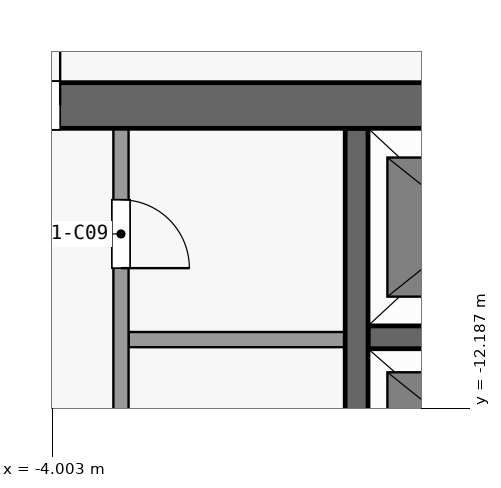
"""IFC4 building model, lengths in metres.
Left out: names, types, materials, properties, quantities, classifications, styles, units other than length and angle.
Written with IfcOpenShell. Run it as: python <this file> out.ifc"""

import sys

from ifc_helpers import new_model, si_unit, direction, frame, frame_2d, origin, place, context, subcontext, project, spatial, rectangle, extrude, element, fill, save


model = new_model("IFC4")
c1 = context("Model", 3, precision=1e-05, world=origin(), true_north=direction((0.0, 1.0)))
c2 = subcontext(c1, "Body", "Model", "MODEL_VIEW")
j1 = project(units=[si_unit("LENGTHUNIT", "METRE"), si_unit("PLANEANGLEUNIT", "RADIAN")], contexts=[c1])
p1 = place(None, origin())
s1 = spatial("IfcSite", under=j1, at=p1, CompositionType="ELEMENT")
p2 = place(p1, origin())
s2 = spatial("IfcBuilding", under=s1, at=p2, CompositionType="ELEMENT")
p3 = place(p2, frame((0.0, 0.0, 167.3)))
s3 = spatial("IfcBuildingStorey", under=s2, at=p3, CompositionType="ELEMENT", Elevation=167.3)
p4 = place(p3, frame((-13.3, -8.2, 0.0), z_axis=(0.0, 0.0, 1.0), x_axis=(1.0, 0.0, 0.0)))
e1 = element("IfcWall", 1, at=p4, inside=s3, PredefinedType="SHEAR", context=c2, shape_type="SweptSolid", body=[
    extrude(rectangle(XDim=26.6, YDim=0.6, at=frame_2d((13.3, 0.0))), origin(), (0.0, 0.0, 1.0), 3.3),
])
p5 = place(p4, frame((7.6, 0.0, 0.0)))
e2 = element("IfcOpeningElement", 2, at=p5, cuts=e1, PredefinedType="OPENING", context=c2, shape_type="SweptSolid", body=[
    extrude(rectangle(XDim=1.8, YDim=2.1, at=frame_2d((0.9, 1.05))), frame((0.0, 0.31, 0.0), z_axis=(0.0, -1.0, 0.0), x_axis=(1.0, 0.0, 0.0)), (0.0, 0.0, 1.0), 0.62),
])
p6 = place(p4, frame((17.2, 0.0, 0.0)))
e3 = element("IfcOpeningElement", 3, at=p6, cuts=e1, PredefinedType="OPENING", context=c2, shape_type="SweptSolid", body=[
    extrude(rectangle(XDim=1.8, YDim=2.1, at=frame_2d((0.9, 1.05))), frame((0.0, 0.31, 0.0), z_axis=(0.0, -1.0, 0.0), x_axis=(1.0, 0.0, 0.0)), (0.0, 0.0, 1.0), 0.62),
])
p7 = place(p4, frame((2.525, 0.0, 0.0)))
e4 = element("IfcOpeningElement", 4, at=p7, cuts=e1, PredefinedType="OPENING", context=c2, shape_type="SweptSolid", body=[
    extrude(rectangle(XDim=0.9, YDim=2.1, at=frame_2d((0.45, 1.05))), frame((0.0, 0.31, 0.0), z_axis=(0.0, -1.0, 0.0), x_axis=(1.0, 0.0, 0.0)), (0.0, 0.0, 1.0), 0.62),
])
p8 = place(p4, frame((23.875, 0.0, 0.0)))
e5 = element("IfcOpeningElement", 5, at=p8, cuts=e1, PredefinedType="OPENING", context=c2, shape_type="SweptSolid", body=[
    extrude(rectangle(XDim=1.2, YDim=2.1, at=frame_2d((0.6, 1.05))), frame((0.0, 0.31, 0.0), z_axis=(0.0, -1.0, 0.0), x_axis=(1.0, 0.0, 0.0)), (0.0, 0.0, 1.0), 0.62),
])
p9 = place(p3, frame((-3.0, -11.28, 0.0), z_axis=(0.0, 0.0, 1.0), x_axis=(1.0, 0.0, 0.0)))
e6 = element("IfcWall", 6, at=p9, inside=s3, PredefinedType="PARTITIONING", context=c2, shape_type="SweptSolid", body=[
    extrude(rectangle(XDim=2.85, YDim=0.2, at=frame_2d((1.425, 0.0))), origin(), (0.0, 0.0, 1.0), 3.3),
])
p10 = place(p3, frame((0.15, -11.25, 0.0), z_axis=(0.0, 0.0, 1.0), x_axis=(1.0, 0.0, 0.0)))
e7 = element("IfcWall", 7, at=p10, inside=s3, PredefinedType="SHEAR", context=c2, shape_type="SweptSolid", body=[
    extrude(rectangle(XDim=2.8, YDim=0.3, at=frame_2d((1.4, 0.0))), origin(), (0.0, 0.0, 1.0), 3.3),
])
p11 = place(p3, frame((-3.1, -8.5, 0.0), z_axis=(0.0, 0.0, 1.0), x_axis=(0.0, -1.0, 0.0)))
e8 = element("IfcWall", 8, at=p11, inside=s3, PredefinedType="PARTITIONING", context=c2, shape_type="SweptSolid", body=[
    extrude(rectangle(XDim=10.97, YDim=0.2, at=frame_2d((5.485, 0.0))), origin(), (0.0, 0.0, 1.0), 3.3),
])
p12 = place(p11, frame((6.35, 0.0, 0.0)))
e9 = element("IfcOpeningElement", 9, at=p12, cuts=e8, PredefinedType="OPENING", context=c2, shape_type="SweptSolid", body=[
    extrude(rectangle(XDim=1.2, YDim=2.1, at=frame_2d((0.6, 1.05))), frame((0.0, 0.11, 0.0), z_axis=(0.0, -1.0, 0.0), x_axis=(1.0, 0.0, 0.0)), (0.0, 0.0, 1.0), 0.22),
])
p13 = place(p11, frame((0.94, 0.0, 0.0)))
e10 = element("IfcOpeningElement", 10, at=p13, cuts=e8, PredefinedType="OPENING", context=c2, shape_type="SweptSolid", body=[
    extrude(rectangle(XDim=0.9, YDim=2.1, at=frame_2d((0.45, 1.05))), frame((0.0, 0.11, 0.0), z_axis=(0.0, -1.0, 0.0), x_axis=(1.0, 0.0, 0.0)), (0.0, 0.0, 1.0), 0.22),
])
p14 = place(p3, frame((0.0, -22.25, 0.0), z_axis=(0.0, 0.0, 1.0), x_axis=(0.0, 1.0, 0.0)))
e11 = element("IfcWall", 11, at=p14, inside=s3, PredefinedType="SHEAR", context=c2, shape_type="SweptSolid", body=[
    extrude(rectangle(XDim=13.75, YDim=0.3, at=frame_2d((6.875, 0.0))), origin(), (0.0, 0.0, 1.0), 3.3),
])
p15 = place(p5, origin())
e12 = element("IfcDoor", 12, at=p15, inside=s3, OperationType="DOUBLE_DOOR_SINGLE_SWING", PredefinedType="DOOR", context=c2, shape_type="SweptSolid", body=[
    extrude(rectangle(XDim=1.8, YDim=2.1, at=frame_2d((0.9, 1.05))), frame((0.0, 0.025, 0.0), z_axis=(0.0, -1.0, 0.0), x_axis=(1.0, 0.0, 0.0)), (0.0, 0.0, 1.0), 0.05),
])
fill(e2, e12)
p16 = place(p13, origin())
e13 = element("IfcDoor", 13, at=p16, inside=s3, OperationType="SINGLE_SWING_RIGHT", PredefinedType="DOOR", context=c2, shape_type="SweptSolid", body=[
    extrude(rectangle(XDim=0.9, YDim=2.1, at=frame_2d((0.45, 1.05))), frame((0.0, 0.025, 0.0), z_axis=(0.0, -1.0, 0.0), x_axis=(1.0, 0.0, 0.0)), (0.0, 0.0, 1.0), 0.05),
])
fill(e10, e13)
save(model, sys.argv[1])
